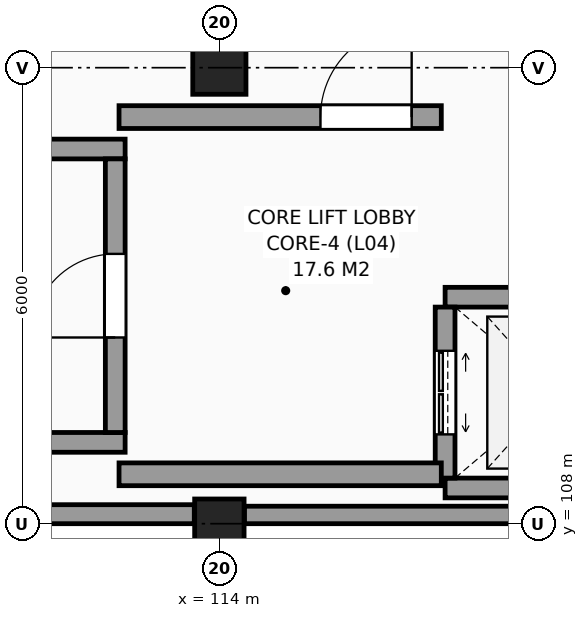
"""IFC4 building model, lengths in metres.
Left out: names, types, materials, properties, quantities, classifications, styles, units other than length and angle.
Written with IfcOpenShell. Run it as: python <this file> out.ifc"""

import sys

from ifc_helpers import new_model, si_unit, direction, frame, frame_2d, origin, origin_2d, place, context, subcontext, project, spatial, rectangle, circle, extrude, element, fill, save


model = new_model("IFC4")
c1 = context("Model", 3, precision=1e-05, world=origin(), true_north=direction((0.0, 1.0)))
c2 = subcontext(c1, "Body", "Model", "MODEL_VIEW")
j1 = project(units=[si_unit("LENGTHUNIT", "METRE"), si_unit("PLANEANGLEUNIT", "RADIAN")], contexts=[c1])
p1 = place(None, origin())
s1 = spatial("IfcSite", under=j1, at=p1, CompositionType="ELEMENT")
p2 = place(p1, origin())
s2 = spatial("IfcBuilding", under=s1, at=p2, CompositionType="ELEMENT")
p3 = place(p2, frame((0.0, 0.0, 19.8)))
s3 = spatial("IfcBuildingStorey", under=s2, at=p3, CompositionType="ELEMENT", Elevation=19.8)
p4 = place(p3, frame((114.0, 108.0, 0.0), z_axis=(0.0, 0.0, 1.0), x_axis=(1.0, 0.0, 0.0)))
e1 = element("IfcColumn", 1, at=p4, inside=s3, PredefinedType="COLUMN", context=c2, shape_type="SweptSolid", body=[
    extrude(rectangle(XDim=0.65, YDim=0.65, at=origin_2d()), origin(), (0.0, 0.0, 1.0), 4.8),
])
p5 = place(p3, frame((114.0, 114.0, 0.0), z_axis=(0.0, 0.0, 1.0), x_axis=(1.0, 0.0, 0.0)))
e2 = element("IfcColumn", 2, at=p5, inside=s3, PredefinedType="COLUMN", context=c2, shape_type="SweptSolid", body=[
    extrude(circle(Radius=0.35, at=origin_2d()), origin(), (0.0, 0.0, 1.0), 4.8),
])
p6 = place(p3, frame((108.355, 108.125, 0.0), z_axis=(0.0, 0.0, 1.0), x_axis=(1.0, 0.0, 0.0)))
e3 = element("IfcWall", 3, at=p6, inside=s3, PredefinedType="SOLIDWALL", context=c2, shape_type="SweptSolid", body=[
    extrude(rectangle(XDim=5.315, YDim=0.25, at=frame_2d((2.657, 0.0))), origin(), (0.0, 0.0, 1.0), 3.9),
])
p7 = place(p3, frame((114.33, 108.115, 0.0), z_axis=(0.0, 0.0, 1.0), x_axis=(1.0, 0.0, 0.0)))
e4 = element("IfcWall", 4, at=p7, inside=s3, PredefinedType="SOLIDWALL", context=c2, shape_type="SweptSolid", body=[
    extrude(rectangle(XDim=5.315, YDim=0.23, at=frame_2d((2.657, 0.0))), origin(), (0.0, 0.0, 1.0), 3.9),
])
for number, where, z_axis, x_axis in (
    (5, (102.04, 109.07, 0.0), (0.0, 0.0, 1.0), (1.0, 0.0, 0.0)),
    (6, (102.04, 112.93, 0.0), (0.0, 0.0, 1.0), (1.0, 0.0, 0.0)),
):
    element("IfcWall", number, at=place(p3, frame(where, z_axis=z_axis, x_axis=x_axis)), inside=s3, PredefinedType="SHEAR", context=c2, shape_type="SweptSolid", body=[
        extrude(rectangle(XDim=10.72, YDim=0.26, at=frame_2d((5.36, 0.0))), origin(), (0.0, 0.0, 1.0), 4.8),
    ])
p8 = place(p3, frame((112.63, 109.2, 0.0), z_axis=(0.0, 0.0, 1.0), x_axis=(0.0, 1.0, 0.0)))
e7 = element("IfcWall", 7, at=p8, inside=s3, PredefinedType="SHEAR", context=c2, shape_type="SweptSolid", body=[
    extrude(rectangle(XDim=3.6, YDim=0.26, at=frame_2d((1.8, 0.0))), origin(), (0.0, 0.0, 1.0), 4.8),
])
p9 = place(p8, frame((1.25, 0.0, 0.0)))
e8 = element("IfcOpeningElement", 8, at=p9, cuts=e7, PredefinedType="OPENING", context=c2, shape_type="SweptSolid", body=[
    extrude(rectangle(XDim=1.1, YDim=2.15, at=frame_2d((0.55, 1.075))), frame((0.0, 0.14, 0.0), z_axis=(0.0, -1.0, 0.0), x_axis=(1.0, 0.0, 0.0)), (0.0, 0.0, 1.0), 0.28),
])
for number, where, z_axis, x_axis in (
    (9, (116.97, 108.47, 0.0), (0.0, 0.0, 1.0), (1.0, 0.0, 0.0)),
    (10, (116.97, 110.98, 0.0), (0.0, 0.0, 1.0), (1.0, 0.0, 0.0)),
):
    element("IfcWall", number, at=place(p3, frame(where, z_axis=z_axis, x_axis=x_axis)), inside=s3, PredefinedType="SHEAR", context=c2, shape_type="SweptSolid", body=[
        extrude(rectangle(XDim=2.91, YDim=0.26, at=frame_2d((1.455, 0.0))), origin(), (0.0, 0.0, 1.0), 4.8),
    ])
p10 = place(p3, frame((116.97, 108.6, 0.0), z_axis=(0.0, 0.0, 1.0), x_axis=(0.0, 1.0, 0.0)))
e11 = element("IfcWall", 11, at=p10, inside=s3, PredefinedType="SHEAR", context=c2, shape_type="SweptSolid", body=[
    extrude(rectangle(XDim=2.25, YDim=0.26, at=frame_2d((1.125, 0.0))), origin(), (0.0, 0.0, 1.0), 4.8),
])
p11 = place(p10, frame((0.575, 0.0, 0.0)))
e12 = element("IfcOpeningElement", 12, at=p11, cuts=e11, PredefinedType="OPENING", context=c2, shape_type="SweptSolid", body=[
    extrude(rectangle(XDim=1.1, YDim=2.2, at=frame_2d((0.55, 1.1))), frame((0.0, 0.14, 0.0), z_axis=(0.0, -1.0, 0.0), x_axis=(1.0, 0.0, 0.0)), (0.0, 0.0, 1.0), 0.28),
])
p12 = place(p3, frame((112.68, 113.35, 0.0), z_axis=(0.0, 0.0, 1.0), x_axis=(1.0, 0.0, 0.0)))
e13 = element("IfcWall", 13, at=p12, inside=s3, PredefinedType="SHEAR", context=c2, shape_type="SweptSolid", body=[
    extrude(rectangle(XDim=4.24, YDim=0.3, at=frame_2d((2.12, 0.0))), origin(), (0.0, 0.0, 1.0), 4.8),
])
p13 = place(p12, frame((2.65, 0.0, 0.0)))
e14 = element("IfcOpeningElement", 14, at=p13, cuts=e13, PredefinedType="OPENING", context=c2, shape_type="SweptSolid", body=[
    extrude(rectangle(XDim=1.2, YDim=2.2, at=frame_2d((0.6, 1.1))), frame((0.0, 0.16, 0.0), z_axis=(0.0, -1.0, 0.0), x_axis=(1.0, 0.0, 0.0)), (0.0, 0.0, 1.0), 0.32),
])
p14 = place(p3, frame((112.68, 108.65, 0.0), z_axis=(0.0, 0.0, 1.0), x_axis=(1.0, 0.0, 0.0)))
e15 = element("IfcWall", 15, at=p14, inside=s3, PredefinedType="SHEAR", context=c2, shape_type="SweptSolid", body=[
    extrude(rectangle(XDim=4.24, YDim=0.3, at=frame_2d((2.12, 0.0))), origin(), (0.0, 0.0, 1.0), 4.8),
])
p15 = place(p9, origin())
e16 = element("IfcDoor", 16, at=p15, inside=s3, OperationType="SINGLE_SWING_LEFT", PredefinedType="DOOR", context=c2, shape_type="SweptSolid", body=[
    extrude(rectangle(XDim=1.1, YDim=2.15, at=frame_2d((0.55, 1.075))), frame((0.0, 0.025, 0.0), z_axis=(0.0, -1.0, 0.0), x_axis=(1.0, 0.0, 0.0)), (0.0, 0.0, 1.0), 0.05),
])
fill(e8, e16)
p16 = place(p11, origin())
e17 = element("IfcDoor", 17, at=p16, inside=s3, OperationType="DOUBLE_DOOR_SLIDING", PredefinedType="DOOR", context=c2, shape_type="SweptSolid", body=[
    extrude(rectangle(XDim=1.1, YDim=2.2, at=frame_2d((0.55, 1.1))), frame((0.0, 0.025, 0.0), z_axis=(0.0, -1.0, 0.0), x_axis=(1.0, 0.0, 0.0)), (0.0, 0.0, 1.0), 0.05),
])
fill(e12, e17)
p17 = place(p13, origin())
e18 = element("IfcDoor", 18, at=p17, inside=s3, OperationType="SINGLE_SWING_RIGHT", PredefinedType="DOOR", context=c2, shape_type="SweptSolid", body=[
    extrude(rectangle(XDim=1.2, YDim=2.2, at=frame_2d((0.6, 1.1))), frame((0.0, 0.025, 0.0), z_axis=(0.0, -1.0, 0.0), x_axis=(1.0, 0.0, 0.0)), (0.0, 0.0, 1.0), 0.05),
])
fill(e14, e18)
save(model, sys.argv[1])
